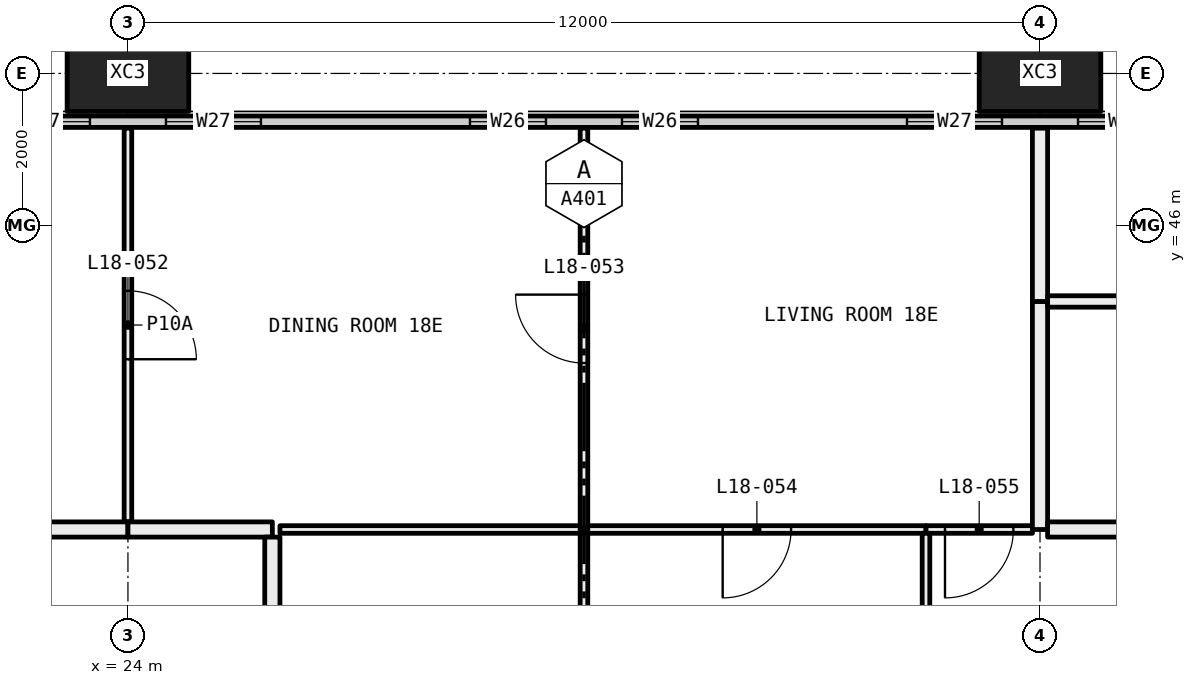
"""IFC4 building model, lengths in metres.
Left out: names, types, materials, properties, quantities, classifications, styles, units other than length and angle.
Written with IfcOpenShell. Run it as: python <this file> out.ifc"""

import sys

from ifc_helpers import new_model, si_unit, direction, frame, frame_2d, origin, origin_2d, place, context, subcontext, project, spatial, rectangle, hollow_rectangle, extrude, element, fill, save


model = new_model("IFC4")
c1 = context("Model", 3, precision=1e-05, world=origin(), true_north=direction((0.0, 1.0)))
c2 = subcontext(c1, "Body", "Model", "MODEL_VIEW")
j1 = project(units=[si_unit("LENGTHUNIT", "METRE"), si_unit("PLANEANGLEUNIT", "RADIAN")], contexts=[c1])
p1 = place(None, origin())
s1 = spatial("IfcSite", under=j1, at=p1, CompositionType="ELEMENT")
p2 = place(p1, origin())
s2 = spatial("IfcBuilding", under=s1, at=p2, CompositionType="ELEMENT")
p3 = place(p2, frame((0.0, 0.0, 74.85)))
s3 = spatial("IfcBuildingStorey", under=s2, at=p3, CompositionType="ELEMENT", Elevation=74.85)
for number, where, z_axis, x_axis in (
    (1, (24.0, 48.0, -0.4), (0.0, 0.0, 1.0), (1.0, 0.0, 0.0)),
    (2, (36.0, 48.0, -0.4), (0.0, 0.0, 1.0), (1.0, 0.0, 0.0)),
):
    element("IfcColumn", number, at=place(p3, frame(where, z_axis=z_axis, x_axis=x_axis)), inside=s3, PredefinedType="COLUMN", context=c2, shape_type="SweptSolid", body=[
        extrude(hollow_rectangle(XDim=1.6, YDim=1.0, WallThickness=0.065, at=origin_2d()), origin(), (0.0, 0.0, 1.0), 3.45),
    ])
p4 = place(p3, frame((6.56, 47.365, 0.0), z_axis=(0.0, 0.0, 1.0), x_axis=(1.0, 0.0, 0.0)))
e3 = element("IfcWall", 3, at=p4, inside=s3, PredefinedType="ELEMENTEDWALL", context=c2, shape_type="SweptSolid", body=[
    extrude(rectangle(XDim=58.88, YDim=0.15, at=frame_2d((29.44, 0.0))), origin(), (0.0, 0.0, 1.0), 3.05),
])
p5 = place(p4, frame((0.44, 0.0, 0.45)))
e4 = element("IfcOpeningElement", 4, at=p5, cuts=e3, PredefinedType="OPENING", context=c2, shape_type="SweptSolid", body=[
    extrude(rectangle(XDim=4.5, YDim=2.55, at=frame_2d((2.25, 1.275))), frame((0.0, 0.085, 0.0), z_axis=(0.0, -1.0, 0.0), x_axis=(1.0, 0.0, 0.0)), (0.0, 0.0, 1.0), 0.17),
])
p6 = place(p4, frame((5.94, 0.0, 0.45)))
e5 = element("IfcOpeningElement", 5, at=p6, cuts=e3, PredefinedType="OPENING", context=c2, shape_type="SweptSolid", body=[
    extrude(rectangle(XDim=1.25, YDim=2.55, at=frame_2d((0.625, 1.275))), frame((0.0, 0.085, 0.0), z_axis=(0.0, -1.0, 0.0), x_axis=(1.0, 0.0, 0.0)), (0.0, 0.0, 1.0), 0.17),
])
p7 = place(p4, frame((9.94, 0.0, 0.45)))
e6 = element("IfcOpeningElement", 6, at=p7, cuts=e3, PredefinedType="OPENING", context=c2, shape_type="SweptSolid", body=[
    extrude(rectangle(XDim=1.0, YDim=2.55, at=frame_2d((0.5, 1.275))), frame((0.0, 0.085, 0.0), z_axis=(0.0, -1.0, 0.0), x_axis=(1.0, 0.0, 0.0)), (0.0, 0.0, 1.0), 0.17),
])
p8 = place(p4, frame((11.94, 0.0, 0.45)))
e7 = element("IfcOpeningElement", 7, at=p8, cuts=e3, PredefinedType="OPENING", context=c2, shape_type="SweptSolid", body=[
    extrude(rectangle(XDim=1.0, YDim=2.55, at=frame_2d((0.5, 1.275))), frame((0.0, 0.085, 0.0), z_axis=(0.0, -1.0, 0.0), x_axis=(1.0, 0.0, 0.0)), (0.0, 0.0, 1.0), 0.17),
])
p9 = place(p4, frame((15.69, 0.0, 0.45)))
e8 = element("IfcOpeningElement", 8, at=p9, cuts=e3, PredefinedType="OPENING", context=c2, shape_type="SweptSolid", body=[
    extrude(rectangle(XDim=1.25, YDim=2.55, at=frame_2d((0.625, 1.275))), frame((0.0, 0.085, 0.0), z_axis=(0.0, -1.0, 0.0), x_axis=(1.0, 0.0, 0.0)), (0.0, 0.0, 1.0), 0.17),
])
p10 = place(p4, frame((17.94, 0.0, 0.45)))
e9 = element("IfcOpeningElement", 9, at=p10, cuts=e3, PredefinedType="OPENING", context=c2, shape_type="SweptSolid", body=[
    extrude(rectangle(XDim=1.25, YDim=2.55, at=frame_2d((0.625, 1.275))), frame((0.0, 0.085, 0.0), z_axis=(0.0, -1.0, 0.0), x_axis=(1.0, 0.0, 0.0)), (0.0, 0.0, 1.0), 0.17),
])
p11 = place(p4, frame((21.94, 0.0, 0.45)))
e10 = element("IfcOpeningElement", 10, at=p11, cuts=e3, PredefinedType="OPENING", context=c2, shape_type="SweptSolid", body=[
    extrude(rectangle(XDim=1.0, YDim=2.55, at=frame_2d((0.5, 1.275))), frame((0.0, 0.085, 0.0), z_axis=(0.0, -1.0, 0.0), x_axis=(1.0, 0.0, 0.0)), (0.0, 0.0, 1.0), 0.17),
])
p12 = place(p4, frame((23.94, 0.0, 0.45)))
e11 = element("IfcOpeningElement", 11, at=p12, cuts=e3, PredefinedType="OPENING", context=c2, shape_type="SweptSolid", body=[
    extrude(rectangle(XDim=1.0, YDim=2.55, at=frame_2d((0.5, 1.275))), frame((0.0, 0.085, 0.0), z_axis=(0.0, -1.0, 0.0), x_axis=(1.0, 0.0, 0.0)), (0.0, 0.0, 1.0), 0.17),
])
p13 = place(p4, frame((27.69, 0.0, 0.45)))
e12 = element("IfcOpeningElement", 12, at=p13, cuts=e3, PredefinedType="OPENING", context=c2, shape_type="SweptSolid", body=[
    extrude(rectangle(XDim=1.25, YDim=2.55, at=frame_2d((0.625, 1.275))), frame((0.0, 0.085, 0.0), z_axis=(0.0, -1.0, 0.0), x_axis=(1.0, 0.0, 0.0)), (0.0, 0.0, 1.0), 0.17),
])
p14 = place(p4, frame((29.94, 0.0, 0.45)))
e13 = element("IfcOpeningElement", 13, at=p14, cuts=e3, PredefinedType="OPENING", context=c2, shape_type="SweptSolid", body=[
    extrude(rectangle(XDim=1.25, YDim=2.55, at=frame_2d((0.625, 1.275))), frame((0.0, 0.085, 0.0), z_axis=(0.0, -1.0, 0.0), x_axis=(1.0, 0.0, 0.0)), (0.0, 0.0, 1.0), 0.17),
])
p15 = place(p4, frame((33.94, 0.0, 0.45)))
e14 = element("IfcOpeningElement", 14, at=p15, cuts=e3, PredefinedType="OPENING", context=c2, shape_type="SweptSolid", body=[
    extrude(rectangle(XDim=1.0, YDim=2.55, at=frame_2d((0.5, 1.275))), frame((0.0, 0.085, 0.0), z_axis=(0.0, -1.0, 0.0), x_axis=(1.0, 0.0, 0.0)), (0.0, 0.0, 1.0), 0.17),
])
p16 = place(p4, frame((35.94, 0.0, 0.45)))
e15 = element("IfcOpeningElement", 15, at=p16, cuts=e3, PredefinedType="OPENING", context=c2, shape_type="SweptSolid", body=[
    extrude(rectangle(XDim=1.0, YDim=2.55, at=frame_2d((0.5, 1.275))), frame((0.0, 0.085, 0.0), z_axis=(0.0, -1.0, 0.0), x_axis=(1.0, 0.0, 0.0)), (0.0, 0.0, 1.0), 0.17),
])
p17 = place(p4, frame((39.69, 0.0, 0.45)))
e16 = element("IfcOpeningElement", 16, at=p17, cuts=e3, PredefinedType="OPENING", context=c2, shape_type="SweptSolid", body=[
    extrude(rectangle(XDim=1.25, YDim=2.55, at=frame_2d((0.625, 1.275))), frame((0.0, 0.085, 0.0), z_axis=(0.0, -1.0, 0.0), x_axis=(1.0, 0.0, 0.0)), (0.0, 0.0, 1.0), 0.17),
])
p18 = place(p4, frame((41.94, 0.0, 0.45)))
e17 = element("IfcOpeningElement", 17, at=p18, cuts=e3, PredefinedType="OPENING", context=c2, shape_type="SweptSolid", body=[
    extrude(rectangle(XDim=1.25, YDim=2.55, at=frame_2d((0.625, 1.275))), frame((0.0, 0.085, 0.0), z_axis=(0.0, -1.0, 0.0), x_axis=(1.0, 0.0, 0.0)), (0.0, 0.0, 1.0), 0.17),
])
p19 = place(p4, frame((45.94, 0.0, 0.45)))
e18 = element("IfcOpeningElement", 18, at=p19, cuts=e3, PredefinedType="OPENING", context=c2, shape_type="SweptSolid", body=[
    extrude(rectangle(XDim=1.0, YDim=2.55, at=frame_2d((0.5, 1.275))), frame((0.0, 0.085, 0.0), z_axis=(0.0, -1.0, 0.0), x_axis=(1.0, 0.0, 0.0)), (0.0, 0.0, 1.0), 0.17),
])
p20 = place(p4, frame((47.94, 0.0, 0.45)))
e19 = element("IfcOpeningElement", 19, at=p20, cuts=e3, PredefinedType="OPENING", context=c2, shape_type="SweptSolid", body=[
    extrude(rectangle(XDim=1.0, YDim=2.55, at=frame_2d((0.5, 1.275))), frame((0.0, 0.085, 0.0), z_axis=(0.0, -1.0, 0.0), x_axis=(1.0, 0.0, 0.0)), (0.0, 0.0, 1.0), 0.17),
])
p21 = place(p4, frame((51.69, 0.0, 0.45)))
e20 = element("IfcOpeningElement", 20, at=p21, cuts=e3, PredefinedType="OPENING", context=c2, shape_type="SweptSolid", body=[
    extrude(rectangle(XDim=1.25, YDim=2.55, at=frame_2d((0.625, 1.275))), frame((0.0, 0.085, 0.0), z_axis=(0.0, -1.0, 0.0), x_axis=(1.0, 0.0, 0.0)), (0.0, 0.0, 1.0), 0.17),
])
p22 = place(p4, frame((53.94, 0.0, 0.45)))
e21 = element("IfcOpeningElement", 21, at=p22, cuts=e3, PredefinedType="OPENING", context=c2, shape_type="SweptSolid", body=[
    extrude(rectangle(XDim=4.5, YDim=2.55, at=frame_2d((2.25, 1.275))), frame((0.0, 0.085, 0.0), z_axis=(0.0, -1.0, 0.0), x_axis=(1.0, 0.0, 0.0)), (0.0, 0.0, 1.0), 0.17),
])
p23 = place(p3, frame((24.0, 42.1, 0.0), z_axis=(0.0, 0.0, 1.0), x_axis=(0.0, 1.0, 0.0)))
e22 = element("IfcWall", 22, at=p23, inside=s3, PredefinedType="PARTITIONING", context=c2, shape_type="SweptSolid", body=[
    extrude(rectangle(XDim=5.18, YDim=0.1, at=frame_2d((2.59, 0.0))), origin(), (0.0, 0.0, 1.0), 3.05),
])
p24 = place(p23, frame((2.14, 0.0, 0.0)))
e23 = element("IfcOpeningElement", 23, at=p24, cuts=e22, PredefinedType="OPENING", context=c2, shape_type="SweptSolid", body=[
    extrude(rectangle(XDim=0.9, YDim=2.1, at=frame_2d((0.45, 1.05))), frame((0.0, 0.06, 0.0), z_axis=(0.0, -1.0, 0.0), x_axis=(1.0, 0.0, 0.0)), (0.0, 0.0, 1.0), 0.12),
])
p25 = place(p3, frame((18.0, 42.0, 0.0), z_axis=(0.0, 0.0, 1.0), x_axis=(1.0, 0.0, 0.0)))
e24 = element("IfcWall", 24, at=p25, inside=s3, PredefinedType="PARTITIONING", context=c2, shape_type="SweptSolid", body=[
    extrude(rectangle(XDim=6.0, YDim=0.2, at=frame_2d((3.0, 0.0))), origin(), (0.0, 0.0, 1.0), 3.05),
])
p26 = place(p25, frame((2.5, 0.0, 0.0)))
e25 = element("IfcOpeningElement", 25, at=p26, cuts=e24, PredefinedType="OPENING", context=c2, shape_type="SweptSolid", body=[
    extrude(rectangle(XDim=1.0, YDim=2.1, at=frame_2d((0.5, 1.05))), frame((0.0, 0.11, 0.0), z_axis=(0.0, -1.0, 0.0), x_axis=(1.0, 0.0, 0.0)), (0.0, 0.0, 1.0), 0.22),
])
p27 = place(p3, frame((30.0, 42.0, 0.0), z_axis=(0.0, 0.0, 1.0), x_axis=(0.0, 1.0, 0.0)))
e26 = element("IfcWall", 26, at=p27, inside=s3, PredefinedType="PARTITIONING", context=c2, shape_type="SweptSolid", body=[
    extrude(rectangle(XDim=5.28, YDim=0.1, at=frame_2d((2.64, 0.0))), origin(), (0.0, 0.0, 1.0), 3.05),
])
p28 = place(p27, frame((2.19, 0.0, 0.0)))
e27 = element("IfcOpeningElement", 27, at=p28, cuts=e26, PredefinedType="OPENING", context=c2, shape_type="SweptSolid", body=[
    extrude(rectangle(XDim=0.9, YDim=2.1, at=frame_2d((0.45, 1.05))), frame((0.0, 0.06, 0.0), z_axis=(0.0, -1.0, 0.0), x_axis=(1.0, 0.0, 0.0)), (0.0, 0.0, 1.0), 0.12),
])
p29 = place(p3, frame((26.0, 42.0, 0.0), z_axis=(0.0, 0.0, 1.0), x_axis=(1.0, 0.0, 0.0)))
e28 = element("IfcWall", 28, at=p29, inside=s3, PredefinedType="PARTITIONING", context=c2, shape_type="SweptSolid", body=[
    extrude(rectangle(XDim=3.95, YDim=0.1, at=frame_2d((1.975, 0.0))), origin(), (0.0, 0.0, 1.0), 3.05),
])
p30 = place(p3, frame((24.0, 42.0, 0.0), z_axis=(0.0, 0.0, 1.0), x_axis=(1.0, 0.0, 0.0)))
e29 = element("IfcWall", 29, at=p30, inside=s3, PredefinedType="PARTITIONING", context=c2, shape_type="SweptSolid", body=[
    extrude(rectangle(XDim=1.9, YDim=0.2, at=frame_2d((0.95, 0.0))), origin(), (0.0, 0.0, 1.0), 3.05),
])
p31 = place(p3, frame((30.05, 42.0, 0.0), z_axis=(0.0, 0.0, 1.0), x_axis=(1.0, 0.0, 0.0)))
e30 = element("IfcWall", 30, at=p31, inside=s3, PredefinedType="PARTITIONING", context=c2, shape_type="SweptSolid", body=[
    extrude(rectangle(XDim=4.45, YDim=0.1, at=frame_2d((2.225, 0.0))), origin(), (0.0, 0.0, 1.0), 3.05),
])
p32 = place(p31, frame((1.775, 0.0, 0.0)))
e31 = element("IfcOpeningElement", 31, at=p32, cuts=e30, PredefinedType="OPENING", context=c2, shape_type="SweptSolid", body=[
    extrude(rectangle(XDim=0.9, YDim=2.1, at=frame_2d((0.45, 1.05))), frame((0.0, 0.06, 0.0), z_axis=(0.0, -1.0, 0.0), x_axis=(1.0, 0.0, 0.0)), (0.0, 0.0, 1.0), 0.12),
])
p33 = place(p3, frame((34.5, 42.0, 0.0), z_axis=(0.0, 0.0, 1.0), x_axis=(1.0, 0.0, 0.0)))
e32 = element("IfcWall", 32, at=p33, inside=s3, PredefinedType="PARTITIONING", context=c2, shape_type="SweptSolid", body=[
    extrude(rectangle(XDim=1.4, YDim=0.1, at=frame_2d((0.7, 0.0))), origin(), (0.0, 0.0, 1.0), 3.05),
])
p34 = place(p33, frame((0.25, 0.0, 0.0)))
e33 = element("IfcOpeningElement", 33, at=p34, cuts=e32, PredefinedType="OPENING", context=c2, shape_type="SweptSolid", body=[
    extrude(rectangle(XDim=0.9, YDim=2.1, at=frame_2d((0.45, 1.05))), frame((0.0, 0.06, 0.0), z_axis=(0.0, -1.0, 0.0), x_axis=(1.0, 0.0, 0.0)), (0.0, 0.0, 1.0), 0.12),
])
p35 = place(p3, frame((36.0, 42.0, 0.0), z_axis=(0.0, 0.0, 1.0), x_axis=(0.0, 1.0, 0.0)))
e34 = element("IfcWall", 34, at=p35, inside=s3, PredefinedType="PARTITIONING", context=c2, shape_type="SweptSolid", body=[
    extrude(rectangle(XDim=3.0, YDim=0.2, at=frame_2d((1.5, 0.0))), origin(), (0.0, 0.0, 1.0), 2.45),
])
p36 = place(p3, frame((36.0, 45.0, 0.0), z_axis=(0.0, 0.0, 1.0), x_axis=(0.0, 1.0, 0.0)))
e35 = element("IfcWall", 35, at=p36, inside=s3, PredefinedType="PARTITIONING", context=c2, shape_type="SweptSolid", body=[
    extrude(rectangle(XDim=2.28, YDim=0.2, at=frame_2d((1.14, 0.0))), origin(), (0.0, 0.0, 1.0), 2.45),
])
p37 = place(p3, frame((30.0, 36.1, 0.0), z_axis=(0.0, 0.0, 1.0), x_axis=(0.0, 1.0, 0.0)))
e36 = element("IfcWall", 36, at=p37, inside=s3, PredefinedType="PARTITIONING", context=c2, shape_type="SweptSolid", body=[
    extrude(rectangle(XDim=5.85, YDim=0.1, at=frame_2d((2.925, 0.0))), origin(), (0.0, 0.0, 1.0), 3.05),
])
p38 = place(p37, frame((2.475, 0.0, 0.0)))
e37 = element("IfcOpeningElement", 37, at=p38, cuts=e36, PredefinedType="OPENING", context=c2, shape_type="SweptSolid", body=[
    extrude(rectangle(XDim=0.9, YDim=2.1, at=frame_2d((0.45, 1.05))), frame((0.0, 0.06, 0.0), z_axis=(0.0, -1.0, 0.0), x_axis=(1.0, 0.0, 0.0)), (0.0, 0.0, 1.0), 0.12),
])
p39 = place(p3, frame((25.9, 41.9, 0.0), z_axis=(0.0, 0.0, 1.0), x_axis=(0.0, -1.0, 0.0)))
e38 = element("IfcWall", 38, at=p39, inside=s3, PredefinedType="PARTITIONING", context=c2, shape_type="SweptSolid", body=[
    extrude(rectangle(XDim=6.2, YDim=0.2, at=frame_2d((3.1, 0.0))), origin(), (0.0, 0.0, 1.0), 2.45),
])
p40 = place(p3, frame((34.5, 36.1, 0.0), z_axis=(0.0, 0.0, 1.0), x_axis=(0.0, 1.0, 0.0)))
e39 = element("IfcWall", 39, at=p40, inside=s3, PredefinedType="PARTITIONING", context=c2, shape_type="SweptSolid", body=[
    extrude(rectangle(XDim=5.85, YDim=0.1, at=frame_2d((2.925, 0.0))), origin(), (0.0, 0.0, 1.0), 3.05),
])
p41 = place(p3, frame((38.4, 42.0, 0.0), z_axis=(0.0, 0.0, 1.0), x_axis=(-1.0, 0.0, 0.0)))
e40 = element("IfcWall", 40, at=p41, inside=s3, PredefinedType="PARTITIONING", context=c2, shape_type="SweptSolid", body=[
    extrude(rectangle(XDim=2.3, YDim=0.2, at=frame_2d((1.15, 0.0))), origin(), (0.0, 0.0, 1.0), 3.05),
])
p42 = place(p3, frame((42.0, 45.0, 0.0), z_axis=(0.0, 0.0, 1.0), x_axis=(-1.0, 0.0, 0.0)))
e41 = element("IfcWall", 41, at=p42, inside=s3, PredefinedType="PARTITIONING", context=c2, shape_type="SweptSolid", body=[
    extrude(rectangle(XDim=5.9, YDim=0.15, at=frame_2d((2.95, 0.0))), origin(), (0.0, 0.0, 1.0), 3.05),
])
p43 = place(p9, origin())
e42 = element("IfcWindow", 42, at=p43, inside=s3, PartitioningType="SINGLE_PANEL", PredefinedType="WINDOW", context=c2, shape_type="SweptSolid", body=[
    extrude(rectangle(XDim=1.25, YDim=2.55, at=frame_2d((0.625, 1.275))), frame((0.0, 0.03, 0.0), z_axis=(0.0, -1.0, 0.0), x_axis=(1.0, 0.0, 0.0)), (0.0, 0.0, 1.0), 0.06),
])
fill(e8, e42)
p44 = place(p10, origin())
e43 = element("IfcWindow", 43, at=p44, inside=s3, PartitioningType="SINGLE_PANEL", PredefinedType="WINDOW", context=c2, shape_type="SweptSolid", body=[
    extrude(rectangle(XDim=1.25, YDim=2.55, at=frame_2d((0.625, 1.275))), frame((0.0, 0.03, 0.0), z_axis=(0.0, -1.0, 0.0), x_axis=(1.0, 0.0, 0.0)), (0.0, 0.0, 1.0), 0.06),
])
fill(e9, e43)
p45 = place(p11, origin())
e44 = element("IfcWindow", 44, at=p45, inside=s3, PartitioningType="SINGLE_PANEL", PredefinedType="WINDOW", context=c2, shape_type="SweptSolid", body=[
    extrude(rectangle(XDim=1.0, YDim=2.55, at=frame_2d((0.5, 1.275))), frame((0.0, 0.03, 0.0), z_axis=(0.0, -1.0, 0.0), x_axis=(1.0, 0.0, 0.0)), (0.0, 0.0, 1.0), 0.06),
])
fill(e10, e44)
p46 = place(p12, origin())
e45 = element("IfcWindow", 45, at=p46, inside=s3, PartitioningType="SINGLE_PANEL", PredefinedType="WINDOW", context=c2, shape_type="SweptSolid", body=[
    extrude(rectangle(XDim=1.0, YDim=2.55, at=frame_2d((0.5, 1.275))), frame((0.0, 0.03, 0.0), z_axis=(0.0, -1.0, 0.0), x_axis=(1.0, 0.0, 0.0)), (0.0, 0.0, 1.0), 0.06),
])
fill(e11, e45)
p47 = place(p13, origin())
e46 = element("IfcWindow", 46, at=p47, inside=s3, PartitioningType="SINGLE_PANEL", PredefinedType="WINDOW", context=c2, shape_type="SweptSolid", body=[
    extrude(rectangle(XDim=1.25, YDim=2.55, at=frame_2d((0.625, 1.275))), frame((0.0, 0.03, 0.0), z_axis=(0.0, -1.0, 0.0), x_axis=(1.0, 0.0, 0.0)), (0.0, 0.0, 1.0), 0.06),
])
fill(e12, e46)
p48 = place(p14, origin())
e47 = element("IfcWindow", 47, at=p48, inside=s3, PartitioningType="SINGLE_PANEL", PredefinedType="WINDOW", context=c2, shape_type="SweptSolid", body=[
    extrude(rectangle(XDim=1.25, YDim=2.55, at=frame_2d((0.625, 1.275))), frame((0.0, 0.03, 0.0), z_axis=(0.0, -1.0, 0.0), x_axis=(1.0, 0.0, 0.0)), (0.0, 0.0, 1.0), 0.06),
])
fill(e13, e47)
p49 = place(p24, frame((0.9, 0.0, 0.0), x_axis=(-1.0, 0.0, 0.0)))
e48 = element("IfcDoor", 48, at=p49, inside=s3, OperationType="SINGLE_SWING_LEFT", PredefinedType="DOOR", context=c2, shape_type="SweptSolid", body=[
    extrude(rectangle(XDim=0.9, YDim=2.1, at=frame_2d((0.45, 1.05))), frame((0.0, 0.025, 0.0), z_axis=(0.0, -1.0, 0.0), x_axis=(1.0, 0.0, 0.0)), (0.0, 0.0, 1.0), 0.05),
])
fill(e23, e48)
p50 = place(p28, origin())
e49 = element("IfcDoor", 49, at=p50, inside=s3, OperationType="SINGLE_SWING_LEFT", PredefinedType="DOOR", context=c2, shape_type="SweptSolid", body=[
    extrude(rectangle(XDim=0.9, YDim=2.1, at=frame_2d((0.45, 1.05))), frame((0.0, 0.025, 0.0), z_axis=(0.0, -1.0, 0.0), x_axis=(1.0, 0.0, 0.0)), (0.0, 0.0, 1.0), 0.05),
])
fill(e27, e49)
p51 = place(p32, frame((0.9, 0.0, 0.0), x_axis=(-1.0, 0.0, 0.0)))
e50 = element("IfcDoor", 50, at=p51, inside=s3, OperationType="SINGLE_SWING_LEFT", PredefinedType="DOOR", context=c2, shape_type="SweptSolid", body=[
    extrude(rectangle(XDim=0.9, YDim=2.1, at=frame_2d((0.45, 1.05))), frame((0.0, 0.025, 0.0), z_axis=(0.0, -1.0, 0.0), x_axis=(1.0, 0.0, 0.0)), (0.0, 0.0, 1.0), 0.05),
])
fill(e31, e50)
p52 = place(p34, frame((0.9, 0.0, 0.0), x_axis=(-1.0, 0.0, 0.0)))
e51 = element("IfcDoor", 51, at=p52, inside=s3, OperationType="SINGLE_SWING_LEFT", PredefinedType="DOOR", context=c2, shape_type="SweptSolid", body=[
    extrude(rectangle(XDim=0.9, YDim=2.1, at=frame_2d((0.45, 1.05))), frame((0.0, 0.025, 0.0), z_axis=(0.0, -1.0, 0.0), x_axis=(1.0, 0.0, 0.0)), (0.0, 0.0, 1.0), 0.05),
])
fill(e33, e51)
save(model, sys.argv[1])
